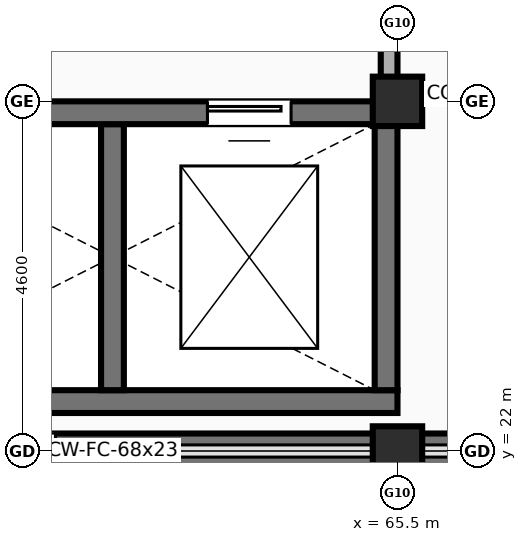
"""IFC4 building model, lengths in metres.
Left out: names, types, materials, properties, quantities, classifications, styles, units other than length and angle.
Written with IfcOpenShell. Run it as: python <this file> out.ifc"""

import sys

from ifc_helpers import new_model, si_unit, direction, frame, frame_2d, origin, origin_2d, place, context, subcontext, project, spatial, polyline, rectangle, outline, extrude, element, fill, save


model = new_model("IFC4")
c1 = context("Model", 3, precision=1e-05, world=origin(), true_north=direction((0.0, 1.0)))
c2 = subcontext(c1, "Body", "Model", "MODEL_VIEW")
j1 = project(units=[si_unit("LENGTHUNIT", "METRE"), si_unit("PLANEANGLEUNIT", "RADIAN")], contexts=[c1])
p1 = place(None, origin())
s1 = spatial("IfcSite", under=j1, at=p1, CompositionType="ELEMENT")
p2 = place(p1, origin())
s2 = spatial("IfcBuilding", under=s1, at=p2, CompositionType="ELEMENT")
p3 = place(p2, frame((0.0, 0.0, 14.2)))
s3 = spatial("IfcBuildingStorey", under=s2, at=p3, CompositionType="ELEMENT", Elevation=14.2)
for number, where, z_axis, x_axis in (
    (1, (65.5, 22.0, 0.0), (0.0, 0.0, 1.0), (1.0, 0.0, 0.0)),
    (2, (65.5, 26.6, 0.0), (0.0, 0.0, 1.0), (1.0, 0.0, 0.0)),
):
    element("IfcColumn", number, at=place(p3, frame(where, z_axis=z_axis, x_axis=x_axis)), inside=s3, PredefinedType="COLUMN", context=c2, shape_type="SweptSolid", body=[
        extrude(rectangle(XDim=0.65, YDim=0.65, at=origin_2d()), origin(), (0.0, 0.0, 1.0), 3.8),
    ])
p4 = place(p3, frame((58.0, 22.65, 0.0), z_axis=(0.0, 0.0, 1.0), x_axis=(1.0, 0.0, 0.0)))
e3 = element("IfcWall", 3, at=p4, inside=s3, PredefinedType="SHEAR", context=c2, shape_type="SweptSolid", body=[
    extrude(rectangle(XDim=7.5, YDim=0.3, at=frame_2d((3.75, 0.0))), origin(), (0.0, 0.0, 1.0), 3.8),
])
for number, where, z_axis, x_axis in (
    (4, (65.35, 22.8, 0.0), (0.0, 0.0, 1.0), (0.0, 1.0, 0.0)),
    (5, (61.75, 22.8, 0.0), (0.0, 0.0, 1.0), (0.0, 1.0, 0.0)),
):
    element("IfcWall", number, at=place(p3, frame(where, z_axis=z_axis, x_axis=x_axis)), inside=s3, PredefinedType="SHEAR", context=c2, shape_type="SweptSolid", body=[
        extrude(rectangle(XDim=3.5, YDim=0.3, at=frame_2d((1.75, 0.0))), origin(), (0.0, 0.0, 1.0), 3.8),
    ])
p5 = place(p3, frame((43.14, 22.0, 3.8), z_axis=(0.0, 0.0, 1.0), x_axis=(1.0, 0.0, 0.0)))
e6 = element("IfcWall", 6, at=p5, inside=s3, PredefinedType="SOLIDWALL", context=c2, shape_type="SweptSolid", body=[
    extrude(outline(polyline([(0.0, 0.0), (29.72, 0.0), (29.72, 2.177), (28.877, 3.859), (28.092, 5.46), (27.125, 6.958), (25.99, 8.333), (24.701, 9.565), (23.277, 10.637), (21.737, 11.536), (20.102, 12.248), (18.395, 12.763), (16.64, 13.076), (14.86, 13.18), (13.08, 13.076), (11.325, 12.763), (9.618, 12.248), (7.983, 11.536), (6.443, 10.637), (5.019, 9.565), (3.73, 8.333), (2.595, 6.958), (1.628, 5.46), (0.843, 3.859), (0.0, 2.177), (0.0, 0.0)])), frame((0.0, 0.23, 0.0), z_axis=(0.0, -1.0, 0.0), x_axis=(1.0, 0.0, 0.0)), (0.0, 0.0, 1.0), 0.46),
])
p6 = place(p5, frame((11.86, 0.0, 3.6)))
e7 = element("IfcOpeningElement", 7, at=p6, cuts=e6, PredefinedType="OPENING", context=c2, shape_type="SweptSolid", body=[
    extrude(outline(polyline([(6.0, 3.0), (5.898, 3.776), (5.598, 4.5), (5.121, 5.121), (4.5, 5.598), (3.776, 5.898), (3.0, 6.0), (2.224, 5.898), (1.5, 5.598), (0.879, 5.121), (0.402, 4.5), (0.102, 3.776), (0.0, 3.0), (0.102, 2.224), (0.402, 1.5), (0.879, 0.879), (1.5, 0.402), (2.224, 0.102), (3.0, 0.0), (3.776, 0.102), (4.5, 0.402), (5.121, 0.879), (5.598, 1.5), (5.898, 2.224), (6.0, 3.0)])), frame((0.0, 0.24, 0.0), z_axis=(0.0, -1.0, 0.0), x_axis=(1.0, 0.0, 0.0)), (0.0, 0.0, 1.0), 0.48),
])
p7 = place(p3, frame((58.0, 26.45, 0.0), z_axis=(0.0, 0.0, 1.0), x_axis=(1.0, 0.0, 0.0)))
e8 = element("IfcWall", 8, at=p7, inside=s3, PredefinedType="SHEAR", context=c2, shape_type="SweptSolid", body=[
    extrude(rectangle(XDim=7.5, YDim=0.3, at=frame_2d((3.75, 0.0))), origin(), (0.0, 0.0, 1.0), 3.8),
])
p8 = place(p7, frame((1.4, 0.0, 0.0)))
e9 = element("IfcOpeningElement", 9, at=p8, cuts=e8, PredefinedType="OPENING", context=c2, shape_type="SweptSolid", body=[
    extrude(rectangle(XDim=1.1, YDim=2.15, at=frame_2d((0.55, 1.075))), frame((0.0, 0.16, 0.0), z_axis=(0.0, -1.0, 0.0), x_axis=(1.0, 0.0, 0.0)), (0.0, 0.0, 1.0), 0.32),
])
p9 = place(p7, frame((5.0, 0.0, 0.0)))
e10 = element("IfcOpeningElement", 10, at=p9, cuts=e8, PredefinedType="OPENING", context=c2, shape_type="SweptSolid", body=[
    extrude(rectangle(XDim=1.1, YDim=2.15, at=frame_2d((0.55, 1.075))), frame((0.0, 0.16, 0.0), z_axis=(0.0, -1.0, 0.0), x_axis=(1.0, 0.0, 0.0)), (0.0, 0.0, 1.0), 0.32),
])
p10 = place(p3, frame((65.39, 26.75, 0.0), z_axis=(0.0, 0.0, 1.0), x_axis=(0.0, 1.0, 0.0)))
e11 = element("IfcWall", 11, at=p10, inside=s3, PredefinedType="SOLIDWALL", context=c2, shape_type="SweptSolid", body=[
    extrude(rectangle(XDim=3.83, YDim=0.22, at=frame_2d((1.915, 0.0))), origin(), (0.0, 0.0, 1.0), 2.7),
])
p11 = place(p6, origin())
e12 = element("IfcWindow", 12, at=p11, inside=s3, PartitioningType="SINGLE_PANEL", PredefinedType="WINDOW", context=c2, shape_type="SweptSolid", body=[
    extrude(outline(polyline([(6.0, 3.0), (5.898, 3.776), (5.598, 4.5), (5.121, 5.121), (4.5, 5.598), (3.776, 5.898), (3.0, 6.0), (2.224, 5.898), (1.5, 5.598), (0.879, 5.121), (0.402, 4.5), (0.102, 3.776), (0.0, 3.0), (0.102, 2.224), (0.402, 1.5), (0.879, 0.879), (1.5, 0.402), (2.224, 0.102), (3.0, 0.0), (3.776, 0.102), (4.5, 0.402), (5.121, 0.879), (5.598, 1.5), (5.898, 2.224), (6.0, 3.0)])), frame((0.0, 0.03, 0.0), z_axis=(0.0, -1.0, 0.0), x_axis=(1.0, 0.0, 0.0)), (0.0, 0.0, 1.0), 0.06),
])
fill(e7, e12)
p12 = place(p9, origin())
e13 = element("IfcDoor", 13, at=p12, inside=s3, OperationType="SLIDING_TO_LEFT", PredefinedType="DOOR", context=c2, shape_type="SweptSolid", body=[
    extrude(rectangle(XDim=1.1, YDim=2.15, at=frame_2d((0.55, 1.075))), frame((0.0, 0.025, 0.0), z_axis=(0.0, -1.0, 0.0), x_axis=(1.0, 0.0, 0.0)), (0.0, 0.0, 1.0), 0.05),
])
fill(e10, e13)
save(model, sys.argv[1])
